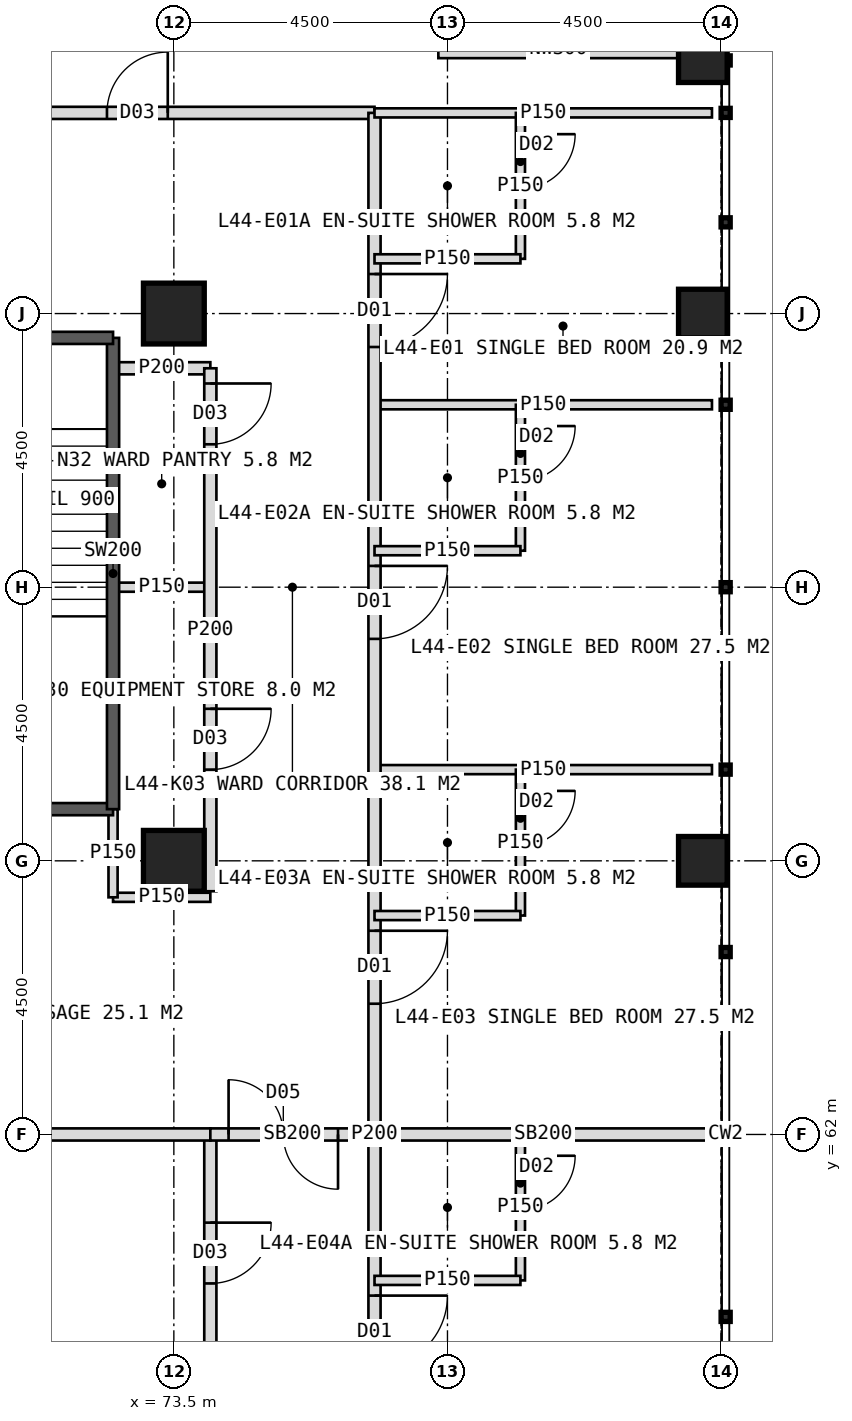
"""IFC4 building model, lengths in metres.
Left out: names, types, materials, properties, quantities, classifications, styles, units other than length and angle.
Written with IfcOpenShell. Run it as: python <this file> out.ifc"""

import sys

from ifc_helpers import new_model, si_unit, direction, frame, frame_2d, origin, origin_2d, place, context, subcontext, project, spatial, rectangle, hollow_rectangle, extrude, element, fill, save


model = new_model("IFC4")
c1 = context("Model", 3, precision=1e-05, world=origin(), true_north=direction((0.0, 1.0)))
c2 = subcontext(c1, "Body", "Model", "MODEL_VIEW")
j1 = project(units=[si_unit("LENGTHUNIT", "METRE"), si_unit("PLANEANGLEUNIT", "RADIAN")], contexts=[c1])
p1 = place(None, origin())
s1 = spatial("IfcSite", under=j1, at=p1, CompositionType="ELEMENT")
p2 = place(p1, origin())
s2 = spatial("IfcBuilding", under=s1, at=p2, CompositionType="ELEMENT")
p3 = place(p2, frame((0.0, 0.0, 185.0)))
s3 = spatial("IfcBuildingStorey", under=s2, at=p3, CompositionType="ELEMENT", Elevation=185.0)
for number, where, z_axis, x_axis in (
    (1, (73.5, 75.5, 0.0), (0.0, 0.0, 1.0), (1.0, 0.0, 0.0)),
    (2, (73.5, 66.5, 0.0), (0.0, 0.0, 1.0), (1.0, 0.0, 0.0)),
):
    element("IfcColumn", number, at=place(p3, frame(where, z_axis=z_axis, x_axis=x_axis)), inside=s3, PredefinedType="COLUMN", context=c2, shape_type="SweptSolid", body=[
        extrude(hollow_rectangle(XDim=1.0, YDim=1.0, WallThickness=0.1, at=origin_2d()), origin(), (0.0, 0.0, 1.0), 4.0),
    ])
for number, where, z_axis, x_axis in (
    (3, (82.2, 66.5, 0.0), (0.0, 0.0, 1.0), (1.0, 0.0, 0.0)),
    (4, (82.2, 75.5, 0.0), (0.0, 0.0, 1.0), (1.0, 0.0, 0.0)),
    (5, (82.2, 79.7, 0.0), (0.0, 0.0, 1.0), (1.0, 0.0, 0.0)),
):
    element("IfcColumn", number, at=place(p3, frame(where, z_axis=z_axis, x_axis=x_axis)), inside=s3, PredefinedType="COLUMN", context=c2, shape_type="SweptSolid", body=[
        extrude(hollow_rectangle(XDim=0.8, YDim=0.8, WallThickness=0.08, at=origin_2d()), origin(), (0.0, 0.0, 1.0), 4.0),
    ])
p4 = place(p3, frame((77.85, 79.85, 0.0), z_axis=(0.0, 0.0, 1.0), x_axis=(1.0, 0.0, 0.0)))
e6 = element("IfcWall", 6, at=p4, inside=s3, PredefinedType="ELEMENTEDWALL", context=c2, shape_type="SweptSolid", body=[
    extrude(rectangle(XDim=3.95, YDim=0.3, at=frame_2d((1.975, 0.0))), origin(), (0.0, 0.0, 1.0), 2.85),
])
p5 = place(p3, frame((43.2, 78.8, 0.0), z_axis=(0.0, 0.0, 1.0), x_axis=(1.0, 0.0, 0.0)))
e7 = element("IfcWall", 7, at=p5, inside=s3, PredefinedType="PARTITIONING", context=c2, shape_type="SweptSolid", body=[
    extrude(rectangle(XDim=33.6, YDim=0.2, at=frame_2d((16.8, 0.0))), origin(), (0.0, 0.0, 1.0), 3.75),
])
p6 = place(p5, frame((2.65, 0.0, 0.0)))
e8 = element("IfcOpeningElement", 8, at=p6, cuts=e7, PredefinedType="OPENING", context=c2, shape_type="SweptSolid", body=[
    extrude(rectangle(XDim=1.2, YDim=2.2, at=frame_2d((0.6, 1.1))), frame((0.0, 0.11, 0.0), z_axis=(0.0, -1.0, 0.0), x_axis=(1.0, 0.0, 0.0)), (0.0, 0.0, 1.0), 0.22),
])
p7 = place(p5, frame((14.05, 0.0, 0.0)))
e9 = element("IfcOpeningElement", 9, at=p7, cuts=e7, PredefinedType="OPENING", context=c2, shape_type="SweptSolid", body=[
    extrude(rectangle(XDim=1.2, YDim=2.2, at=frame_2d((0.6, 1.1))), frame((0.0, 0.11, 0.0), z_axis=(0.0, -1.0, 0.0), x_axis=(1.0, 0.0, 0.0)), (0.0, 0.0, 1.0), 0.22),
])
p8 = place(p5, frame((22.45, 0.0, 0.0)))
e10 = element("IfcOpeningElement", 10, at=p8, cuts=e7, PredefinedType="OPENING", context=c2, shape_type="SweptSolid", body=[
    extrude(rectangle(XDim=1.2, YDim=2.2, at=frame_2d((0.6, 1.1))), frame((0.0, 0.11, 0.0), z_axis=(0.0, -1.0, 0.0), x_axis=(1.0, 0.0, 0.0)), (0.0, 0.0, 1.0), 0.22),
])
p9 = place(p5, frame((29.2, 0.0, 0.0)))
e11 = element("IfcOpeningElement", 11, at=p9, cuts=e7, PredefinedType="OPENING", context=c2, shape_type="SweptSolid", body=[
    extrude(rectangle(XDim=1.0, YDim=2.1, at=frame_2d((0.5, 1.05))), frame((0.0, 0.11, 0.0), z_axis=(0.0, -1.0, 0.0), x_axis=(1.0, 0.0, 0.0)), (0.0, 0.0, 1.0), 0.22),
])
p10 = place(p3, frame((72.5, 74.6, 0.0), z_axis=(0.0, 0.0, 1.0), x_axis=(1.0, 0.0, 0.0)))
e12 = element("IfcWall", 12, at=p10, inside=s3, PredefinedType="PARTITIONING", context=c2, shape_type="SweptSolid", body=[
    extrude(rectangle(XDim=1.6, YDim=0.2, at=frame_2d((0.8, 0.0))), origin(), (0.0, 0.0, 1.0), 3.75),
])
for number, where, z_axis, x_axis in (
    (13, (76.8, 74.0, 0.0), (0.0, 0.0, 1.0), (1.0, 0.0, 0.0)),
    (14, (76.8, 68.0, 0.0), (0.0, 0.0, 1.0), (1.0, 0.0, 0.0)),
):
    element("IfcWall", number, at=place(p3, frame(where, z_axis=z_axis, x_axis=x_axis)), inside=s3, PredefinedType="PARTITIONING", context=c2, shape_type="SweptSolid", body=[
        extrude(rectangle(XDim=5.55, YDim=0.15, at=frame_2d((2.775, 0.0))), origin(), (0.0, 0.0, 1.0), 3.75),
    ])
p11 = place(p3, frame((76.8, 62.0, 0.0), z_axis=(0.0, 0.0, 1.0), x_axis=(1.0, 0.0, 0.0)))
e15 = element("IfcWall", 15, at=p11, inside=s3, PredefinedType="SOLIDWALL", context=c2, shape_type="SweptSolid", body=[
    extrude(rectangle(XDim=5.55, YDim=0.2, at=frame_2d((2.775, 0.0))), origin(), (0.0, 0.0, 1.0), 2.95),
])
p12 = place(p3, frame((76.8, 78.8, 0.0), z_axis=(0.0, 0.0, 1.0), x_axis=(0.0, -1.0, 0.0)))
e16 = element("IfcWall", 16, at=p12, inside=s3, PredefinedType="PARTITIONING", context=c2, shape_type="SweptSolid", body=[
    extrude(rectangle(XDim=33.6, YDim=0.2, at=frame_2d((16.8, 0.0))), origin(), (0.0, 0.0, 1.0), 3.75),
])
p13 = place(p12, frame((2.65, 0.0, 0.0)))
e17 = element("IfcOpeningElement", 17, at=p13, cuts=e16, PredefinedType="OPENING", context=c2, shape_type="SweptSolid", body=[
    extrude(rectangle(XDim=1.2, YDim=2.2, at=frame_2d((0.6, 1.1))), frame((0.0, 0.11, 0.0), z_axis=(0.0, -1.0, 0.0), x_axis=(1.0, 0.0, 0.0)), (0.0, 0.0, 1.0), 0.22),
])
p14 = place(p12, frame((7.45, 0.0, 0.0)))
e18 = element("IfcOpeningElement", 18, at=p14, cuts=e16, PredefinedType="OPENING", context=c2, shape_type="SweptSolid", body=[
    extrude(rectangle(XDim=1.2, YDim=2.2, at=frame_2d((0.6, 1.1))), frame((0.0, 0.11, 0.0), z_axis=(0.0, -1.0, 0.0), x_axis=(1.0, 0.0, 0.0)), (0.0, 0.0, 1.0), 0.22),
])
p15 = place(p12, frame((13.45, 0.0, 0.0)))
e19 = element("IfcOpeningElement", 19, at=p15, cuts=e16, PredefinedType="OPENING", context=c2, shape_type="SweptSolid", body=[
    extrude(rectangle(XDim=1.2, YDim=2.2, at=frame_2d((0.6, 1.1))), frame((0.0, 0.11, 0.0), z_axis=(0.0, -1.0, 0.0), x_axis=(1.0, 0.0, 0.0)), (0.0, 0.0, 1.0), 0.22),
])
p16 = place(p12, frame((19.45, 0.0, 0.0)))
e20 = element("IfcOpeningElement", 20, at=p16, cuts=e16, PredefinedType="OPENING", context=c2, shape_type="SweptSolid", body=[
    extrude(rectangle(XDim=1.2, YDim=2.2, at=frame_2d((0.6, 1.1))), frame((0.0, 0.11, 0.0), z_axis=(0.0, -1.0, 0.0), x_axis=(1.0, 0.0, 0.0)), (0.0, 0.0, 1.0), 0.22),
])
p17 = place(p12, frame((25.45, 0.0, 0.0)))
e21 = element("IfcOpeningElement", 21, at=p17, cuts=e16, PredefinedType="OPENING", context=c2, shape_type="SweptSolid", body=[
    extrude(rectangle(XDim=1.2, YDim=2.2, at=frame_2d((0.6, 1.1))), frame((0.0, 0.11, 0.0), z_axis=(0.0, -1.0, 0.0), x_axis=(1.0, 0.0, 0.0)), (0.0, 0.0, 1.0), 0.22),
])
p18 = place(p3, frame((76.8, 78.8, 0.0), z_axis=(0.0, 0.0, 1.0), x_axis=(1.0, 0.0, 0.0)))
e22 = element("IfcWall", 22, at=p18, inside=s3, PredefinedType="PARTITIONING", context=c2, shape_type="SweptSolid", body=[
    extrude(rectangle(XDim=5.55, YDim=0.15, at=frame_2d((2.775, 0.0))), origin(), (0.0, 0.0, 1.0), 3.75),
])
p19 = place(p3, frame((79.2, 78.8, 0.0), z_axis=(0.0, 0.0, 1.0), x_axis=(0.0, -1.0, 0.0)))
e23 = element("IfcWall", 23, at=p19, inside=s3, PredefinedType="PARTITIONING", context=c2, shape_type="SweptSolid", body=[
    extrude(rectangle(XDim=2.4, YDim=0.15, at=frame_2d((1.2, 0.0))), origin(), (0.0, 0.0, 1.0), 3.75),
])
p20 = place(p19, frame((0.35, 0.0, 0.0)))
e24 = element("IfcOpeningElement", 24, at=p20, cuts=e23, PredefinedType="OPENING", context=c2, shape_type="SweptSolid", body=[
    extrude(rectangle(XDim=0.9, YDim=2.1, at=frame_2d((0.45, 1.05))), frame((0.0, 0.085, 0.0), z_axis=(0.0, -1.0, 0.0), x_axis=(1.0, 0.0, 0.0)), (0.0, 0.0, 1.0), 0.17),
])
p21 = place(p3, frame((76.8, 76.4, 0.0), z_axis=(0.0, 0.0, 1.0), x_axis=(1.0, 0.0, 0.0)))
e25 = element("IfcWall", 25, at=p21, inside=s3, PredefinedType="PARTITIONING", context=c2, shape_type="SweptSolid", body=[
    extrude(rectangle(XDim=2.4, YDim=0.15, at=frame_2d((1.2, 0.0))), origin(), (0.0, 0.0, 1.0), 3.75),
])
p22 = place(p3, frame((79.2, 74.0, 0.0), z_axis=(0.0, 0.0, 1.0), x_axis=(0.0, -1.0, 0.0)))
e26 = element("IfcWall", 26, at=p22, inside=s3, PredefinedType="PARTITIONING", context=c2, shape_type="SweptSolid", body=[
    extrude(rectangle(XDim=2.4, YDim=0.15, at=frame_2d((1.2, 0.0))), origin(), (0.0, 0.0, 1.0), 3.75),
])
p23 = place(p22, frame((0.35, 0.0, 0.0)))
e27 = element("IfcOpeningElement", 27, at=p23, cuts=e26, PredefinedType="OPENING", context=c2, shape_type="SweptSolid", body=[
    extrude(rectangle(XDim=0.9, YDim=2.1, at=frame_2d((0.45, 1.05))), frame((0.0, 0.085, 0.0), z_axis=(0.0, -1.0, 0.0), x_axis=(1.0, 0.0, 0.0)), (0.0, 0.0, 1.0), 0.17),
])
p24 = place(p3, frame((76.8, 71.6, 0.0), z_axis=(0.0, 0.0, 1.0), x_axis=(1.0, 0.0, 0.0)))
e28 = element("IfcWall", 28, at=p24, inside=s3, PredefinedType="PARTITIONING", context=c2, shape_type="SweptSolid", body=[
    extrude(rectangle(XDim=2.4, YDim=0.15, at=frame_2d((1.2, 0.0))), origin(), (0.0, 0.0, 1.0), 3.75),
])
p25 = place(p3, frame((79.2, 68.0, 0.0), z_axis=(0.0, 0.0, 1.0), x_axis=(0.0, -1.0, 0.0)))
e29 = element("IfcWall", 29, at=p25, inside=s3, PredefinedType="PARTITIONING", context=c2, shape_type="SweptSolid", body=[
    extrude(rectangle(XDim=2.4, YDim=0.15, at=frame_2d((1.2, 0.0))), origin(), (0.0, 0.0, 1.0), 3.75),
])
p26 = place(p25, frame((0.35, 0.0, 0.0)))
e30 = element("IfcOpeningElement", 30, at=p26, cuts=e29, PredefinedType="OPENING", context=c2, shape_type="SweptSolid", body=[
    extrude(rectangle(XDim=0.9, YDim=2.1, at=frame_2d((0.45, 1.05))), frame((0.0, 0.085, 0.0), z_axis=(0.0, -1.0, 0.0), x_axis=(1.0, 0.0, 0.0)), (0.0, 0.0, 1.0), 0.17),
])
p27 = place(p3, frame((76.8, 65.6, 0.0), z_axis=(0.0, 0.0, 1.0), x_axis=(1.0, 0.0, 0.0)))
e31 = element("IfcWall", 31, at=p27, inside=s3, PredefinedType="PARTITIONING", context=c2, shape_type="SweptSolid", body=[
    extrude(rectangle(XDim=2.4, YDim=0.15, at=frame_2d((1.2, 0.0))), origin(), (0.0, 0.0, 1.0), 3.75),
])
p28 = place(p3, frame((79.2, 62.0, 0.0), z_axis=(0.0, 0.0, 1.0), x_axis=(0.0, -1.0, 0.0)))
e32 = element("IfcWall", 32, at=p28, inside=s3, PredefinedType="PARTITIONING", context=c2, shape_type="SweptSolid", body=[
    extrude(rectangle(XDim=2.4, YDim=0.15, at=frame_2d((1.2, 0.0))), origin(), (0.0, 0.0, 1.0), 3.75),
])
p29 = place(p28, frame((0.35, 0.0, 0.0)))
e33 = element("IfcOpeningElement", 33, at=p29, cuts=e32, PredefinedType="OPENING", context=c2, shape_type="SweptSolid", body=[
    extrude(rectangle(XDim=0.9, YDim=2.1, at=frame_2d((0.45, 1.05))), frame((0.0, 0.085, 0.0), z_axis=(0.0, -1.0, 0.0), x_axis=(1.0, 0.0, 0.0)), (0.0, 0.0, 1.0), 0.17),
])
p30 = place(p3, frame((76.8, 59.6, 0.0), z_axis=(0.0, 0.0, 1.0), x_axis=(1.0, 0.0, 0.0)))
e34 = element("IfcWall", 34, at=p30, inside=s3, PredefinedType="PARTITIONING", context=c2, shape_type="SweptSolid", body=[
    extrude(rectangle(XDim=2.4, YDim=0.15, at=frame_2d((1.2, 0.0))), origin(), (0.0, 0.0, 1.0), 3.75),
])
p31 = place(p3, frame((72.5, 71.0, 0.0), z_axis=(0.0, 0.0, 1.0), x_axis=(1.0, 0.0, 0.0)))
e35 = element("IfcWall", 35, at=p31, inside=s3, PredefinedType="PARTITIONING", context=c2, shape_type="SweptSolid", body=[
    extrude(rectangle(XDim=1.6, YDim=0.15, at=frame_2d((0.8, 0.0))), origin(), (0.0, 0.0, 1.0), 3.75),
])
p32 = place(p3, frame((74.1, 74.6, 0.0), z_axis=(0.0, 0.0, 1.0), x_axis=(0.0, -1.0, 0.0)))
e36 = element("IfcWall", 36, at=p32, inside=s3, PredefinedType="PARTITIONING", context=c2, shape_type="SweptSolid", body=[
    extrude(rectangle(XDim=8.6, YDim=0.2, at=frame_2d((4.3, 0.0))), origin(), (0.0, 0.0, 1.0), 3.75),
])
p33 = place(p32, frame((0.25, 0.0, 0.0)))
e37 = element("IfcOpeningElement", 37, at=p33, cuts=e36, PredefinedType="OPENING", context=c2, shape_type="SweptSolid", body=[
    extrude(rectangle(XDim=1.0, YDim=2.1, at=frame_2d((0.5, 1.05))), frame((0.0, 0.11, 0.0), z_axis=(0.0, -1.0, 0.0), x_axis=(1.0, 0.0, 0.0)), (0.0, 0.0, 1.0), 0.22),
])
p34 = place(p32, frame((5.6, 0.0, 0.0)))
e38 = element("IfcOpeningElement", 38, at=p34, cuts=e36, PredefinedType="OPENING", context=c2, shape_type="SweptSolid", body=[
    extrude(rectangle(XDim=1.0, YDim=2.1, at=frame_2d((0.5, 1.05))), frame((0.0, 0.11, 0.0), z_axis=(0.0, -1.0, 0.0), x_axis=(1.0, 0.0, 0.0)), (0.0, 0.0, 1.0), 0.22),
])
p35 = place(p3, frame((74.1, 62.0, 0.0), z_axis=(0.0, 0.0, 1.0), x_axis=(0.0, -1.0, 0.0)))
e39 = element("IfcWall", 39, at=p35, inside=s3, PredefinedType="PARTITIONING", context=c2, shape_type="SweptSolid", body=[
    extrude(rectangle(XDim=14.1, YDim=0.2, at=frame_2d((7.05, 0.0))), origin(), (0.0, 0.0, 1.0), 3.75),
])
p36 = place(p35, frame((1.45, 0.0, 0.0)))
e40 = element("IfcOpeningElement", 40, at=p36, cuts=e39, PredefinedType="OPENING", context=c2, shape_type="SweptSolid", body=[
    extrude(rectangle(XDim=1.0, YDim=2.1, at=frame_2d((0.5, 1.05))), frame((0.0, 0.11, 0.0), z_axis=(0.0, -1.0, 0.0), x_axis=(1.0, 0.0, 0.0)), (0.0, 0.0, 1.0), 0.22),
])
p37 = place(p35, frame((11.05, 0.0, 0.0)))
e41 = element("IfcOpeningElement", 41, at=p37, cuts=e39, PredefinedType="OPENING", context=c2, shape_type="SweptSolid", body=[
    extrude(rectangle(XDim=1.0, YDim=2.1, at=frame_2d((0.5, 1.05))), frame((0.0, 0.11, 0.0), z_axis=(0.0, -1.0, 0.0), x_axis=(1.0, 0.0, 0.0)), (0.0, 0.0, 1.0), 0.22),
])
p38 = place(p3, frame((72.5, 65.9, 0.0), z_axis=(0.0, 0.0, 1.0), x_axis=(1.0, 0.0, 0.0)))
e42 = element("IfcWall", 42, at=p38, inside=s3, PredefinedType="PARTITIONING", context=c2, shape_type="SweptSolid", body=[
    extrude(rectangle(XDim=1.6, YDim=0.15, at=frame_2d((0.8, 0.0))), origin(), (0.0, 0.0, 1.0), 3.75),
])
p39 = place(p3, frame((69.0, 62.0, 0.0), z_axis=(0.0, 0.0, 1.0), x_axis=(1.0, 0.0, 0.0)))
e43 = element("IfcWall", 43, at=p39, inside=s3, PredefinedType="SOLIDWALL", context=c2, shape_type="SweptSolid", body=[
    extrude(rectangle(XDim=5.1, YDim=0.2, at=frame_2d((2.55, 0.0))), origin(), (0.0, 0.0, 1.0), 2.95),
])
p40 = place(p3, frame((74.1, 62.0, 0.0), z_axis=(0.0, 0.0, 1.0), x_axis=(1.0, 0.0, 0.0)))
e44 = element("IfcWall", 44, at=p40, inside=s3, PredefinedType="SOLIDWALL", context=c2, shape_type="SweptSolid", body=[
    extrude(rectangle(XDim=2.7, YDim=0.2, at=frame_2d((1.35, 0.0))), origin(), (0.0, 0.0, 1.0), 2.95),
])
p41 = place(p40, frame((0.3, 0.0, 0.0)))
e45 = element("IfcOpeningElement", 45, at=p41, cuts=e44, PredefinedType="OPENING", context=c2, shape_type="SweptSolid", body=[
    extrude(rectangle(XDim=1.8, YDim=2.2, at=frame_2d((0.9, 1.1))), frame((0.0, 0.11, 0.0), z_axis=(0.0, -1.0, 0.0), x_axis=(1.0, 0.0, 0.0)), (0.0, 0.0, 1.0), 0.22),
])
p42 = place(p3, frame((72.5, 65.9, 0.0), z_axis=(0.0, 0.0, 1.0), x_axis=(0.0, 1.0, 0.0)))
e46 = element("IfcWall", 46, at=p42, inside=s3, PredefinedType="PARTITIONING", context=c2, shape_type="SweptSolid", body=[
    extrude(rectangle(XDim=1.45, YDim=0.15, at=frame_2d((0.725, 0.0))), origin(), (0.0, 0.0, 1.0), 3.75),
])
p43 = place(p3, frame((69.0, 67.35, 0.0), z_axis=(0.0, 0.0, 1.0), x_axis=(1.0, 0.0, 0.0)))
e47 = element("IfcWall", 47, at=p43, inside=s3, PredefinedType="SOLIDWALL", context=c2, shape_type="SweptSolid", body=[
    extrude(rectangle(XDim=3.5, YDim=0.2, at=frame_2d((1.75, 0.0))), origin(), (0.0, 0.0, 1.0), 3.75),
])
p44 = place(p3, frame((72.5, 67.35, 0.0), z_axis=(0.0, 0.0, 1.0), x_axis=(0.0, 1.0, 0.0)))
e48 = element("IfcWall", 48, at=p44, inside=s3, PredefinedType="SOLIDWALL", context=c2, shape_type="SweptSolid", body=[
    extrude(rectangle(XDim=7.75, YDim=0.2, at=frame_2d((3.875, 0.0))), origin(), (0.0, 0.0, 1.0), 3.75),
])
p45 = place(p3, frame((69.0, 75.1, 0.0), z_axis=(0.0, 0.0, 1.0), x_axis=(1.0, 0.0, 0.0)))
e49 = element("IfcWall", 49, at=p45, inside=s3, PredefinedType="SOLIDWALL", context=c2, shape_type="SweptSolid", body=[
    extrude(rectangle(XDim=3.5, YDim=0.2, at=frame_2d((1.75, 0.0))), origin(), (0.0, 0.0, 1.0), 3.75),
])
p46 = place(p45, frame((1.15, 0.0, 0.0)))
e50 = element("IfcOpeningElement", 50, at=p46, cuts=e49, PredefinedType="OPENING", context=c2, shape_type="SweptSolid", body=[
    extrude(rectangle(XDim=1.2, YDim=2.1, at=frame_2d((0.6, 1.05))), frame((0.0, 0.11, 0.0), z_axis=(0.0, -1.0, 0.0), x_axis=(1.0, 0.0, 0.0)), (0.0, 0.0, 1.0), 0.22),
])
p47 = place(p9, origin())
e51 = element("IfcDoor", 51, at=p47, inside=s3, OperationType="SINGLE_SWING_RIGHT", PredefinedType="DOOR", context=c2, shape_type="SweptSolid", body=[
    extrude(rectangle(XDim=1.0, YDim=2.1, at=frame_2d((0.5, 1.05))), frame((0.0, 0.025, 0.0), z_axis=(0.0, -1.0, 0.0), x_axis=(1.0, 0.0, 0.0)), (0.0, 0.0, 1.0), 0.05),
])
fill(e11, e51)
p48 = place(p33, origin())
e52 = element("IfcDoor", 52, at=p48, inside=s3, OperationType="SINGLE_SWING_LEFT", PredefinedType="DOOR", context=c2, shape_type="SweptSolid", body=[
    extrude(rectangle(XDim=1.0, YDim=2.1, at=frame_2d((0.5, 1.05))), frame((0.0, 0.025, 0.0), z_axis=(0.0, -1.0, 0.0), x_axis=(1.0, 0.0, 0.0)), (0.0, 0.0, 1.0), 0.05),
])
fill(e37, e52)
p49 = place(p13, origin())
e53 = element("IfcDoor", 53, at=p49, inside=s3, OperationType="SINGLE_SWING_LEFT", PredefinedType="DOOR", context=c2, shape_type="SweptSolid", body=[
    extrude(rectangle(XDim=1.2, YDim=2.2, at=frame_2d((0.6, 1.1))), frame((0.0, 0.025, 0.0), z_axis=(0.0, -1.0, 0.0), x_axis=(1.0, 0.0, 0.0)), (0.0, 0.0, 1.0), 0.05),
])
fill(e17, e53)
p50 = place(p20, origin())
e54 = element("IfcDoor", 54, at=p50, inside=s3, OperationType="SINGLE_SWING_LEFT", PredefinedType="DOOR", context=c2, shape_type="SweptSolid", body=[
    extrude(rectangle(XDim=0.9, YDim=2.1, at=frame_2d((0.45, 1.05))), frame((0.0, 0.025, 0.0), z_axis=(0.0, -1.0, 0.0), x_axis=(1.0, 0.0, 0.0)), (0.0, 0.0, 1.0), 0.05),
])
fill(e24, e54)
p51 = place(p14, origin())
e55 = element("IfcDoor", 55, at=p51, inside=s3, OperationType="SINGLE_SWING_LEFT", PredefinedType="DOOR", context=c2, shape_type="SweptSolid", body=[
    extrude(rectangle(XDim=1.2, YDim=2.2, at=frame_2d((0.6, 1.1))), frame((0.0, 0.025, 0.0), z_axis=(0.0, -1.0, 0.0), x_axis=(1.0, 0.0, 0.0)), (0.0, 0.0, 1.0), 0.05),
])
fill(e18, e55)
p52 = place(p23, origin())
e56 = element("IfcDoor", 56, at=p52, inside=s3, OperationType="SINGLE_SWING_LEFT", PredefinedType="DOOR", context=c2, shape_type="SweptSolid", body=[
    extrude(rectangle(XDim=0.9, YDim=2.1, at=frame_2d((0.45, 1.05))), frame((0.0, 0.025, 0.0), z_axis=(0.0, -1.0, 0.0), x_axis=(1.0, 0.0, 0.0)), (0.0, 0.0, 1.0), 0.05),
])
fill(e27, e56)
p53 = place(p15, origin())
e57 = element("IfcDoor", 57, at=p53, inside=s3, OperationType="SINGLE_SWING_LEFT", PredefinedType="DOOR", context=c2, shape_type="SweptSolid", body=[
    extrude(rectangle(XDim=1.2, YDim=2.2, at=frame_2d((0.6, 1.1))), frame((0.0, 0.025, 0.0), z_axis=(0.0, -1.0, 0.0), x_axis=(1.0, 0.0, 0.0)), (0.0, 0.0, 1.0), 0.05),
])
fill(e19, e57)
p54 = place(p26, origin())
e58 = element("IfcDoor", 58, at=p54, inside=s3, OperationType="SINGLE_SWING_LEFT", PredefinedType="DOOR", context=c2, shape_type="SweptSolid", body=[
    extrude(rectangle(XDim=0.9, YDim=2.1, at=frame_2d((0.45, 1.05))), frame((0.0, 0.025, 0.0), z_axis=(0.0, -1.0, 0.0), x_axis=(1.0, 0.0, 0.0)), (0.0, 0.0, 1.0), 0.05),
])
fill(e30, e58)
p55 = place(p16, origin())
e59 = element("IfcDoor", 59, at=p55, inside=s3, OperationType="SINGLE_SWING_LEFT", PredefinedType="DOOR", context=c2, shape_type="SweptSolid", body=[
    extrude(rectangle(XDim=1.2, YDim=2.2, at=frame_2d((0.6, 1.1))), frame((0.0, 0.025, 0.0), z_axis=(0.0, -1.0, 0.0), x_axis=(1.0, 0.0, 0.0)), (0.0, 0.0, 1.0), 0.05),
])
fill(e20, e59)
p56 = place(p29, origin())
e60 = element("IfcDoor", 60, at=p56, inside=s3, OperationType="SINGLE_SWING_LEFT", PredefinedType="DOOR", context=c2, shape_type="SweptSolid", body=[
    extrude(rectangle(XDim=0.9, YDim=2.1, at=frame_2d((0.45, 1.05))), frame((0.0, 0.025, 0.0), z_axis=(0.0, -1.0, 0.0), x_axis=(1.0, 0.0, 0.0)), (0.0, 0.0, 1.0), 0.05),
])
fill(e33, e60)
p57 = place(p34, origin())
e61 = element("IfcDoor", 61, at=p57, inside=s3, OperationType="SINGLE_SWING_LEFT", PredefinedType="DOOR", context=c2, shape_type="SweptSolid", body=[
    extrude(rectangle(XDim=1.0, YDim=2.1, at=frame_2d((0.5, 1.05))), frame((0.0, 0.025, 0.0), z_axis=(0.0, -1.0, 0.0), x_axis=(1.0, 0.0, 0.0)), (0.0, 0.0, 1.0), 0.05),
])
fill(e38, e61)
p58 = place(p36, origin())
e62 = element("IfcDoor", 62, at=p58, inside=s3, OperationType="SINGLE_SWING_LEFT", PredefinedType="DOOR", context=c2, shape_type="SweptSolid", body=[
    extrude(rectangle(XDim=1.0, YDim=2.1, at=frame_2d((0.5, 1.05))), frame((0.0, 0.025, 0.0), z_axis=(0.0, -1.0, 0.0), x_axis=(1.0, 0.0, 0.0)), (0.0, 0.0, 1.0), 0.05),
])
fill(e40, e62)
p59 = place(p41, origin())
e63 = element("IfcDoor", 63, at=p59, inside=s3, OperationType="DOUBLE_DOOR_DOUBLE_SWING", PredefinedType="DOOR", context=c2, shape_type="SweptSolid", body=[
    extrude(rectangle(XDim=1.8, YDim=2.2, at=frame_2d((0.9, 1.1))), frame((0.0, 0.025, 0.0), z_axis=(0.0, -1.0, 0.0), x_axis=(1.0, 0.0, 0.0)), (0.0, 0.0, 1.0), 0.05),
])
fill(e45, e63)
save(model, sys.argv[1])
